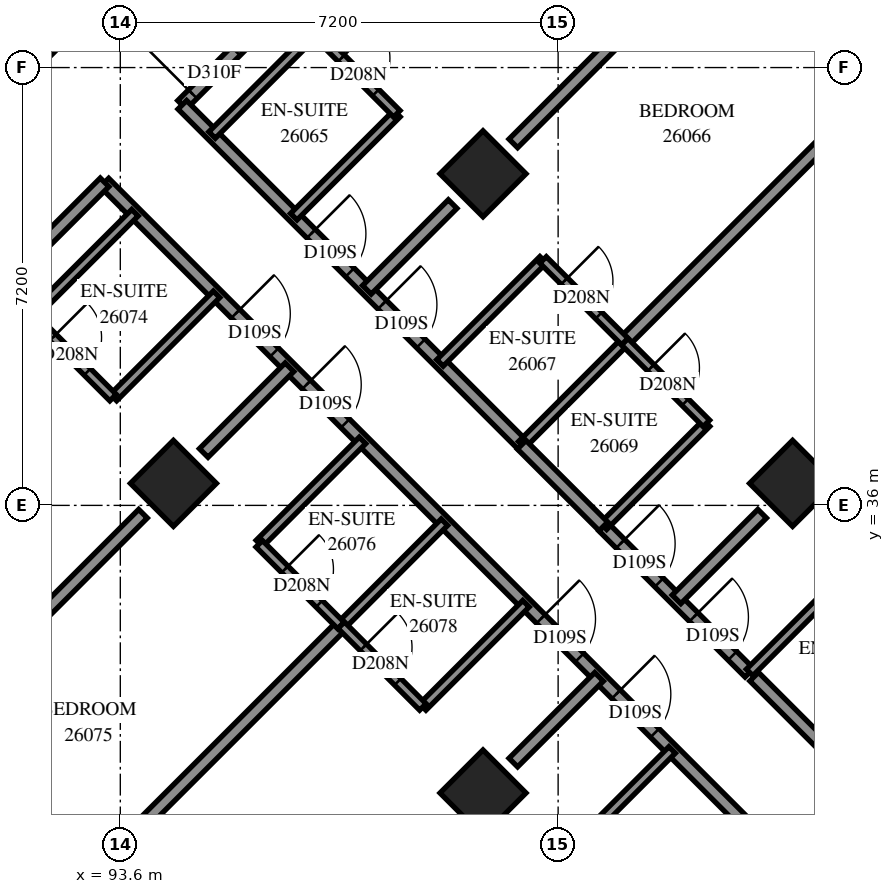
"""IFC4 building model, lengths in metres.
Left out: names, types, materials, properties, quantities, classifications, styles, units other than length and angle.
Written with IfcOpenShell. Run it as: python <this file> out.ifc"""

import sys

from ifc_helpers import new_model, si_unit, direction, frame, frame_2d, origin, origin_2d, place, context, subcontext, project, spatial, rectangle, extrude, element, fill, save


model = new_model("IFC4")
c1 = context("Model", 3, precision=1e-05, world=origin(), true_north=direction((0.0, 1.0)))
c2 = subcontext(c1, "Body", "Model", "MODEL_VIEW")
j1 = project(units=[si_unit("LENGTHUNIT", "METRE"), si_unit("PLANEANGLEUNIT", "RADIAN")], contexts=[c1])
p1 = place(None, origin())
s1 = spatial("IfcSite", under=j1, at=p1, CompositionType="ELEMENT")
p2 = place(p1, origin())
s2 = spatial("IfcBuilding", under=s1, at=p2, CompositionType="ELEMENT")
p3 = place(p2, frame((0.0, 0.0, 98.2)))
s3 = spatial("IfcBuildingStorey", under=s2, at=p3, CompositionType="ELEMENT", Elevation=98.2)
for number, where, z_axis, x_axis in (
    (1, (99.565, 41.453, 0.0), (0.0, 0.0, 1.0), (0.707, -0.707, 0.0)),
    (2, (94.474, 36.362, 0.0), (0.0, 0.0, 1.0), (0.707, -0.707, 0.0)),
    (3, (104.656, 36.362, 0.0), (0.0, 0.0, 1.0), (0.707, -0.707, 0.0)),
    (4, (99.565, 31.271, 0.0), (0.0, 0.0, 1.0), (0.707, -0.707, 0.0)),
):
    element("IfcColumn", number, at=place(p3, frame(where, z_axis=z_axis, x_axis=x_axis)), inside=s3, PredefinedType="COLUMN", context=c2, shape_type="SweptSolid", body=[
        extrude(rectangle(XDim=1.0, YDim=1.0, at=origin_2d()), origin(), (0.0, 0.0, 1.0), 3.1),
    ])
p4 = place(p3, frame((87.12, 38.625, -0.3), z_axis=(0.0, 0.0, 1.0), x_axis=(0.7071067812, 0.7071067812, 0.0)))
e5 = element("IfcWall", 5, at=p4, inside=s3, PredefinedType="SHEAR", context=c2, shape_type="SweptSolid", body=[
    extrude(rectangle(XDim=14.4, YDim=0.8, at=frame_2d((7.2, 0.0))), origin(), (0.0, 0.0, 1.0), 2.7),
])
p5 = place(p4, frame((4.55, 0.0, 0.3)))
e6 = element("IfcOpeningElement", 6, at=p5, cuts=e5, PredefinedType="OPENING", context=c2, shape_type="SweptSolid", body=[
    extrude(rectangle(XDim=1.1, YDim=2.1, at=frame_2d((0.55, 1.05))), frame((0.0, 0.41, 0.0), z_axis=(0.0, -1.0, 0.0), x_axis=(1.0, 0.0, 0.0)), (0.0, 0.0, 1.0), 0.82),
])
p6 = place(p4, frame((11.35, 0.0, 0.3)))
e7 = element("IfcOpeningElement", 7, at=p6, cuts=e5, PredefinedType="OPENING", context=c2, shape_type="SweptSolid", body=[
    extrude(rectangle(XDim=1.1, YDim=2.1, at=frame_2d((0.55, 1.05))), frame((0.0, 0.41, 0.0), z_axis=(0.0, -1.0, 0.0), x_axis=(1.0, 0.0, 0.0)), (0.0, 0.0, 1.0), 0.82),
])
p7 = place(p3, frame((93.339, 41.309, 0.0), z_axis=(0.0, 0.0, 1.0), x_axis=(0.7071067812, -0.7071067812, 0.0)))
e8 = element("IfcWall", 8, at=p7, inside=s3, PredefinedType="PARTITIONING", context=c2, shape_type="SweptSolid", body=[
    extrude(rectangle(XDim=18.702, YDim=0.2, at=frame_2d((9.351, 0.0))), origin(), (0.0, 0.0, 1.0), 3.1),
])
p8 = place(p7, frame((3.05, 0.0, 0.0)))
e9 = element("IfcOpeningElement", 9, at=p8, cuts=e8, PredefinedType="OPENING", context=c2, shape_type="SweptSolid", body=[
    extrude(rectangle(XDim=0.9, YDim=2.1, at=frame_2d((0.45, 1.05))), frame((0.0, 0.11, 0.0), z_axis=(0.0, -1.0, 0.0), x_axis=(1.0, 0.0, 0.0)), (0.0, 0.0, 1.0), 0.22),
])
p9 = place(p7, frame((4.7, 0.0, 0.0)))
e10 = element("IfcOpeningElement", 10, at=p9, cuts=e8, PredefinedType="OPENING", context=c2, shape_type="SweptSolid", body=[
    extrude(rectangle(XDim=0.9, YDim=2.1, at=frame_2d((0.45, 1.05))), frame((0.0, 0.11, 0.0), z_axis=(0.0, -1.0, 0.0), x_axis=(1.0, 0.0, 0.0)), (0.0, 0.0, 1.0), 0.22),
])
p10 = place(p7, frame((10.149, 0.0, 0.0)))
e11 = element("IfcOpeningElement", 11, at=p10, cuts=e8, PredefinedType="OPENING", context=c2, shape_type="SweptSolid", body=[
    extrude(rectangle(XDim=0.9, YDim=2.1, at=frame_2d((0.45, 1.05))), frame((0.0, 0.11, 0.0), z_axis=(0.0, -1.0, 0.0), x_axis=(1.0, 0.0, 0.0)), (0.0, 0.0, 1.0), 0.22),
])
p11 = place(p7, frame((11.9, 0.0, 0.0)))
e12 = element("IfcOpeningElement", 12, at=p11, cuts=e8, PredefinedType="OPENING", context=c2, shape_type="SweptSolid", body=[
    extrude(rectangle(XDim=0.9, YDim=2.1, at=frame_2d((0.45, 1.05))), frame((0.0, 0.11, 0.0), z_axis=(0.0, -1.0, 0.0), x_axis=(1.0, 0.0, 0.0)), (0.0, 0.0, 1.0), 0.22),
])
p12 = place(p7, frame((17.45, 0.0, 0.0)))
e13 = element("IfcOpeningElement", 13, at=p12, cuts=e8, PredefinedType="OPENING", context=c2, shape_type="SweptSolid", body=[
    extrude(rectangle(XDim=0.9, YDim=2.1, at=frame_2d((0.45, 1.05))), frame((0.0, 0.11, 0.0), z_axis=(0.0, -1.0, 0.0), x_axis=(1.0, 0.0, 0.0)), (0.0, 0.0, 1.0), 0.22),
])
p13 = place(p3, frame((86.835, 34.806, 0.0), z_axis=(0.0, 0.0, 1.0), x_axis=(0.7071067812, 0.7071067812, 0.0)))
e14 = element("IfcWall", 14, at=p13, inside=s3, PredefinedType="PARTITIONING", context=c2, shape_type="SweptSolid", body=[
    extrude(rectangle(XDim=9.201, YDim=0.2, at=frame_2d((4.601, 0.0))), origin(), (0.0, 0.0, 1.0), 3.1),
])
p14 = place(p3, frame((94.615, 42.587, 0.0), z_axis=(0.0, 0.0, 1.0), x_axis=(0.7071067812, 0.7071067812, 0.0)))
e15 = element("IfcWall", 15, at=p14, inside=s3, PredefinedType="PARTITIONING", context=c2, shape_type="SweptSolid", body=[
    extrude(rectangle(XDim=9.198, YDim=0.2, at=frame_2d((4.599, 0.0))), origin(), (0.0, 0.0, 1.0), 3.1),
])
p15 = place(p14, frame((0.248, 0.0, 0.0)))
e16 = element("IfcOpeningElement", 16, at=p15, cuts=e15, PredefinedType="OPENING", context=c2, shape_type="SweptSolid", body=[
    extrude(rectangle(XDim=1.0, YDim=2.1, at=frame_2d((0.5, 1.05))), frame((0.0, 0.11, 0.0), z_axis=(0.0, -1.0, 0.0), x_axis=(1.0, 0.0, 0.0)), (0.0, 0.0, 1.0), 0.22),
])
p16 = place(p3, frame((101.896, 38.698, 0.0), z_axis=(0.0, 0.0, 1.0), x_axis=(0.7072296489, 0.7069838921, 0.0)))
e17 = element("IfcWall", 17, at=p16, inside=s3, PredefinedType="PARTITIONING", context=c2, shape_type="SweptSolid", body=[
    extrude(rectangle(XDim=8.545, YDim=0.2, at=frame_2d((4.272, 0.0))), origin(), (0.0, 0.0, 1.0), 3.1),
])
p17 = place(p3, frame((91.46, 28.252, 0.0), z_axis=(0.0, 0.0, 1.0), x_axis=(0.7072292282, 0.706984313, 0.0)))
e18 = element("IfcWall", 18, at=p17, inside=s3, PredefinedType="PARTITIONING", context=c2, shape_type="SweptSolid", body=[
    extrude(rectangle(XDim=8.166, YDim=0.2, at=frame_2d((4.083, 0.0))), origin(), (0.0, 0.0, 1.0), 3.1),
])
p18 = place(p3, frame((94.62, 42.587, 0.0), z_axis=(0.0, 0.0, 1.0), x_axis=(0.7071067812, -0.7071067812, 0.0)))
e19 = element("IfcWall", 19, at=p18, inside=s3, PredefinedType="PARTITIONING", context=c2, shape_type="SweptSolid", body=[
    extrude(rectangle(XDim=7.9, YDim=0.2, at=frame_2d((3.95, 0.0))), origin(), (0.0, 0.0, 1.0), 3.1),
])
p19 = place(p18, frame((2.998, 0.0, 0.0)))
e20 = element("IfcOpeningElement", 20, at=p19, cuts=e19, PredefinedType="OPENING", context=c2, shape_type="SweptSolid", body=[
    extrude(rectangle(XDim=0.9, YDim=2.1, at=frame_2d((0.45, 1.05))), frame((0.0, 0.11, 0.0), z_axis=(0.0, -1.0, 0.0), x_axis=(1.0, 0.0, 0.0)), (0.0, 0.0, 1.0), 0.22),
])
p20 = place(p18, frame((4.649, 0.0, 0.0)))
e21 = element("IfcOpeningElement", 21, at=p20, cuts=e19, PredefinedType="OPENING", context=c2, shape_type="SweptSolid", body=[
    extrude(rectangle(XDim=0.9, YDim=2.1, at=frame_2d((0.45, 1.05))), frame((0.0, 0.11, 0.0), z_axis=(0.0, -1.0, 0.0), x_axis=(1.0, 0.0, 0.0)), (0.0, 0.0, 1.0), 0.22),
])
for number, where, z_axis, x_axis in (
    (22, (89.881, 31.771, 0.0), (0.0, 0.0, 1.0), (0.707, 0.707, 0.0)),
    (23, (100.063, 41.953, 0.0), (0.0, 0.0, 1.0), (0.707, 0.707, 0.0)),
):
    element("IfcWall", number, at=place(p3, frame(where, z_axis=z_axis, x_axis=x_axis)), inside=s3, PredefinedType="PARTITIONING", context=c2, shape_type="SweptSolid", body=[
        extrude(rectangle(XDim=5.787, YDim=0.2, at=frame_2d((2.893, 0.0))), origin(), (0.0, 0.0, 1.0), 3.1),
    ])
p21 = place(p3, frame((104.023, 33.184, 0.0), z_axis=(0.0, 0.0, 1.0), x_axis=(0.7071067812, -0.7071067812, 0.0)))
e24 = element("IfcWall", 24, at=p21, inside=s3, PredefinedType="PARTITIONING", context=c2, shape_type="SweptSolid", body=[
    extrude(rectangle(XDim=5.399, YDim=0.2, at=frame_2d((2.7, 0.0))), origin(), (0.0, 0.0, 1.0), 3.1),
])
p22 = place(p21, frame((4.08, 0.0, 0.0)))
e25 = element("IfcOpeningElement", 25, at=p22, cuts=e24, PredefinedType="OPENING", context=c2, shape_type="SweptSolid", body=[
    extrude(rectangle(XDim=0.9, YDim=2.1, at=frame_2d((0.45, 1.05))), frame((0.0, 0.11, 0.0), z_axis=(0.0, -1.0, 0.0), x_axis=(1.0, 0.0, 0.0)), (0.0, 0.0, 1.0), 0.22),
])
p23 = place(p3, frame((101.541, 35.651, 0.0), z_axis=(0.0, 0.0, 1.0), x_axis=(0.7071067812, -0.7071067812, 0.0)))
e26 = element("IfcWall", 26, at=p23, inside=s3, PredefinedType="PARTITIONING", context=c2, shape_type="SweptSolid", body=[
    extrude(rectangle(XDim=3.4, YDim=0.2, at=frame_2d((1.7, 0.0))), origin(), (0.0, 0.0, 1.0), 3.1),
])
p24 = place(p23, frame((0.4, 0.0, 0.0)))
e27 = element("IfcOpeningElement", 27, at=p24, cuts=e26, PredefinedType="OPENING", context=c2, shape_type="SweptSolid", body=[
    extrude(rectangle(XDim=0.9, YDim=2.1, at=frame_2d((0.45, 1.05))), frame((0.0, 0.11, 0.0), z_axis=(0.0, -1.0, 0.0), x_axis=(1.0, 0.0, 0.0)), (0.0, 0.0, 1.0), 0.22),
])
p25 = place(p23, frame((2.105, 0.0, 0.0)))
e28 = element("IfcOpeningElement", 28, at=p25, cuts=e26, PredefinedType="OPENING", context=c2, shape_type="SweptSolid", body=[
    extrude(rectangle(XDim=0.9, YDim=2.1, at=frame_2d((0.45, 1.05))), frame((0.0, 0.11, 0.0), z_axis=(0.0, -1.0, 0.0), x_axis=(1.0, 0.0, 0.0)), (0.0, 0.0, 1.0), 0.22),
])
for number, where, z_axis, x_axis in (
    (29, (100.977, 30.281, 0.0), (0.0, 0.0, 1.0), (0.707, 0.707, 0.0)),
    (30, (98.573, 32.685, 0.0), (0.0, 0.0, 1.0), (0.707, 0.707, 0.0)),
):
    element("IfcWall", number, at=place(p3, frame(where, z_axis=z_axis, x_axis=x_axis)), inside=s3, PredefinedType="PARTITIONING", context=c2, shape_type="SweptSolid", body=[
        extrude(rectangle(XDim=2.401, YDim=0.15, at=frame_2d((1.201, 0.0))), origin(), (0.0, 0.0, 1.0), 3.1),
    ])
for number, where, z_axis, x_axis in (
    (31, (92.143, 39.117, 0.0), (0.0, 0.0, 1.0), (0.708, 0.707, 0.0)),
    (32, (93.487, 37.773, 0.0), (0.0, 0.0, 1.0), (0.707, 0.708, 0.0)),
    (33, (97.234, 34.026, 0.0), (0.0, 0.0, 1.0), (0.707, 0.708, 0.0)),
    (34, (100.203, 36.997, 0.0), (0.0, 0.0, 1.0), (0.707, 0.708, 0.0)),
):
    element("IfcWall", number, at=place(p3, frame(where, z_axis=z_axis, x_axis=x_axis)), inside=s3, PredefinedType="PARTITIONING", context=c2, shape_type="SweptSolid", body=[
        extrude(rectangle(XDim=2.4, YDim=0.15, at=frame_2d((1.2, 0.0))), origin(), (0.0, 0.0, 1.0), 3.1),
    ])
for number, where, z_axis, x_axis in (
    (35, (96.453, 40.747, 0.0), (0.0, 0.0, 1.0), (0.707, 0.707, 0.0)),
    (36, (95.109, 42.091, 0.0), (0.0, 0.0, 1.0), (0.707, 0.707, 0.0)),
    (37, (95.887, 35.373, 0.0), (0.0, 0.0, 1.0), (0.707, 0.707, 0.0)),
    (38, (98.857, 38.343, 0.0), (0.0, 0.0, 1.0), (0.707, 0.707, 0.0)),
    (39, (101.545, 35.657, 0.0), (0.0, 0.0, 1.0), (0.707, 0.707, 0.0)),
    (40, (103.949, 33.253, 0.0), (0.0, 0.0, 1.0), (0.707, 0.707, 0.0)),
):
    element("IfcWall", number, at=place(p3, frame(where, z_axis=z_axis, x_axis=x_axis)), inside=s3, PredefinedType="PARTITIONING", context=c2, shape_type="SweptSolid", body=[
        extrude(rectangle(XDim=2.398, YDim=0.15, at=frame_2d((1.199, 0.0))), origin(), (0.0, 0.0, 1.0), 3.1),
    ])
for number, where, z_axis, x_axis in (
    (41, (100.063, 31.771, 0.0), (0.0, 0.0, 1.0), (0.707, 0.707, 0.0)),
    (42, (97.655, 39.545, 0.0), (0.0, 0.0, 1.0), (0.707, 0.707, 0.0)),
    (43, (94.972, 36.862, 0.0), (0.0, 0.0, 1.0), (0.707, 0.707, 0.0)),
):
    element("IfcWall", number, at=place(p3, frame(where, z_axis=z_axis, x_axis=x_axis)), inside=s3, PredefinedType="PARTITIONING", context=c2, shape_type="SweptSolid", body=[
        extrude(rectangle(XDim=1.994, YDim=0.2, at=frame_2d((0.997, 0.0))), origin(), (0.0, 0.0, 1.0), 3.1),
    ])
p26 = place(p3, frame((102.747, 34.455, 0.0), z_axis=(0.0, 0.0, 1.0), x_axis=(0.7071067812, 0.7071067812, 0.0)))
e44 = element("IfcWall", 44, at=p26, inside=s3, PredefinedType="PARTITIONING", context=c2, shape_type="SweptSolid", body=[
    extrude(rectangle(XDim=1.991, YDim=0.2, at=frame_2d((0.996, 0.0))), origin(), (0.0, 0.0, 1.0), 3.1),
])
p27 = place(p3, frame((96.803, 43.783, 0.0), z_axis=(0.0, 0.0, 1.0), x_axis=(0.7071067812, -0.7071067812, 0.0)))
e45 = element("IfcWall", 45, at=p27, inside=s3, PredefinedType="PARTITIONING", context=c2, shape_type="SweptSolid", body=[
    extrude(rectangle(XDim=1.901, YDim=0.15, at=frame_2d((0.95, 0.0))), origin(), (0.0, 0.0, 1.0), 3.1),
])
p28 = place(p27, frame((0.609, 0.0, 0.0)))
e46 = element("IfcOpeningElement", 46, at=p28, cuts=e45, PredefinedType="OPENING", context=c2, shape_type="SweptSolid", body=[
    extrude(rectangle(XDim=0.8, YDim=2.1, at=frame_2d((0.4, 1.05))), frame((0.0, 0.085, 0.0), z_axis=(0.0, -1.0, 0.0), x_axis=(1.0, 0.0, 0.0)), (0.0, 0.0, 1.0), 0.17),
])
p29 = place(p3, frame((101.894, 38.693, 0.0), z_axis=(0.0, 0.0, 1.0), x_axis=(0.7071067812, -0.7071067812, 0.0)))
e47 = element("IfcWall", 47, at=p29, inside=s3, PredefinedType="PARTITIONING", context=c2, shape_type="SweptSolid", body=[
    extrude(rectangle(XDim=1.901, YDim=0.15, at=frame_2d((0.95, 0.0))), origin(), (0.0, 0.0, 1.0), 3.1),
])
p30 = place(p29, frame((0.608, 0.0, 0.0)))
e48 = element("IfcOpeningElement", 48, at=p30, cuts=e47, PredefinedType="OPENING", context=c2, shape_type="SweptSolid", body=[
    extrude(rectangle(XDim=0.8, YDim=2.1, at=frame_2d((0.4, 1.05))), frame((0.0, 0.085, 0.0), z_axis=(0.0, -1.0, 0.0), x_axis=(1.0, 0.0, 0.0)), (0.0, 0.0, 1.0), 0.17),
])
p31 = place(p3, frame((95.885, 35.369, 0.0), z_axis=(0.0, 0.0, 1.0), x_axis=(0.7071067812, -0.7071067812, 0.0)))
e49 = element("IfcWall", 49, at=p31, inside=s3, PredefinedType="PARTITIONING", context=c2, shape_type="SweptSolid", body=[
    extrude(rectangle(XDim=1.901, YDim=0.15, at=frame_2d((0.95, 0.0))), origin(), (0.0, 0.0, 1.0), 3.1),
])
p32 = place(p31, frame((0.595, 0.0, 0.0)))
e50 = element("IfcOpeningElement", 50, at=p32, cuts=e49, PredefinedType="OPENING", context=c2, shape_type="SweptSolid", body=[
    extrude(rectangle(XDim=0.8, YDim=2.1, at=frame_2d((0.4, 1.05))), frame((0.0, 0.085, 0.0), z_axis=(0.0, -1.0, 0.0), x_axis=(1.0, 0.0, 0.0)), (0.0, 0.0, 1.0), 0.17),
])
p33 = place(p3, frame((92.137, 39.117, 0.0), z_axis=(0.0, 0.0, 1.0), x_axis=(0.7071067812, -0.7071067812, 0.0)))
e51 = element("IfcWall", 51, at=p33, inside=s3, PredefinedType="PARTITIONING", context=c2, shape_type="SweptSolid", body=[
    extrude(rectangle(XDim=1.901, YDim=0.15, at=frame_2d((0.95, 0.0))), origin(), (0.0, 0.0, 1.0), 3.1),
])
p34 = place(p33, frame((0.502, 0.0, 0.0)))
e52 = element("IfcOpeningElement", 52, at=p34, cuts=e51, PredefinedType="OPENING", context=c2, shape_type="SweptSolid", body=[
    extrude(rectangle(XDim=0.8, YDim=2.1, at=frame_2d((0.4, 1.05))), frame((0.0, 0.085, 0.0), z_axis=(0.0, -1.0, 0.0), x_axis=(1.0, 0.0, 0.0)), (0.0, 0.0, 1.0), 0.17),
])
p35 = place(p3, frame((100.553, 40.037, 0.0), z_axis=(0.0, 0.0, 1.0), x_axis=(0.7076330979, -0.7065800724, 0.0)))
e53 = element("IfcWall", 53, at=p35, inside=s3, PredefinedType="PARTITIONING", context=c2, shape_type="SweptSolid", body=[
    extrude(rectangle(XDim=1.899, YDim=0.15, at=frame_2d((0.95, 0.0))), origin(), (0.0, 0.0, 1.0), 3.1),
])
p36 = place(p35, frame((0.493, 0.0, 0.0)))
e54 = element("IfcOpeningElement", 54, at=p36, cuts=e53, PredefinedType="OPENING", context=c2, shape_type="SweptSolid", body=[
    extrude(rectangle(XDim=0.8, YDim=2.1, at=frame_2d((0.4, 1.05))), frame((0.0, 0.085, 0.0), z_axis=(0.0, -1.0, 0.0), x_axis=(1.0, 0.0, 0.0)), (0.0, 0.0, 1.0), 0.17),
])
p37 = place(p3, frame((97.233, 34.029, 0.0), z_axis=(0.0, 0.0, 1.0), x_axis=(0.7065800724, -0.7076330979, 0.0)))
e55 = element("IfcWall", 55, at=p37, inside=s3, PredefinedType="PARTITIONING", context=c2, shape_type="SweptSolid", body=[
    extrude(rectangle(XDim=1.899, YDim=0.15, at=frame_2d((0.95, 0.0))), origin(), (0.0, 0.0, 1.0), 3.1),
])
p38 = place(p37, frame((0.515, 0.0, 0.0)))
e56 = element("IfcOpeningElement", 56, at=p38, cuts=e55, PredefinedType="OPENING", context=c2, shape_type="SweptSolid", body=[
    extrude(rectangle(XDim=0.8, YDim=2.1, at=frame_2d((0.4, 1.05))), frame((0.0, 0.085, 0.0), z_axis=(0.0, -1.0, 0.0), x_axis=(1.0, 0.0, 0.0)), (0.0, 0.0, 1.0), 0.17),
])
p39 = place(p3, frame((100.201, 36.997, 0.0), z_axis=(0.0, 0.0, 1.0), x_axis=(0.7076330979, -0.7065800724, 0.0)))
e57 = element("IfcWall", 57, at=p39, inside=s3, PredefinedType="PARTITIONING", context=c2, shape_type="SweptSolid", body=[
    extrude(rectangle(XDim=1.899, YDim=0.2, at=frame_2d((0.95, 0.0))), origin(), (0.0, 0.0, 1.0), 3.1),
])
p40 = place(p15, origin())
e58 = element("IfcDoor", 58, at=p40, inside=s3, OperationType="SINGLE_SWING_RIGHT", PredefinedType="DOOR", context=c2, shape_type="SweptSolid", body=[
    extrude(rectangle(XDim=1.0, YDim=2.1, at=frame_2d((0.5, 1.05))), frame((0.0, 0.025, 0.0), z_axis=(0.0, -1.0, 0.0), x_axis=(1.0, 0.0, 0.0)), (0.0, 0.0, 1.0), 0.05),
])
fill(e16, e58)
p41 = place(p19, origin())
e59 = element("IfcDoor", 59, at=p41, inside=s3, OperationType="SINGLE_SWING_RIGHT", PredefinedType="DOOR", context=c2, shape_type="SweptSolid", body=[
    extrude(rectangle(XDim=0.9, YDim=2.1, at=frame_2d((0.45, 1.05))), frame((0.0, 0.025, 0.0), z_axis=(0.0, -1.0, 0.0), x_axis=(1.0, 0.0, 0.0)), (0.0, 0.0, 1.0), 0.05),
])
fill(e20, e59)
p42 = place(p28, origin())
e60 = element("IfcDoor", 60, at=p42, inside=s3, OperationType="SINGLE_SWING_RIGHT", PredefinedType="DOOR", context=c2, shape_type="SweptSolid", body=[
    extrude(rectangle(XDim=0.8, YDim=2.1, at=frame_2d((0.4, 1.05))), frame((0.0, 0.025, 0.0), z_axis=(0.0, -1.0, 0.0), x_axis=(1.0, 0.0, 0.0)), (0.0, 0.0, 1.0), 0.05),
])
fill(e46, e60)
p43 = place(p20, origin())
e61 = element("IfcDoor", 61, at=p43, inside=s3, OperationType="SINGLE_SWING_LEFT", PredefinedType="DOOR", context=c2, shape_type="SweptSolid", body=[
    extrude(rectangle(XDim=0.9, YDim=2.1, at=frame_2d((0.45, 1.05))), frame((0.0, 0.025, 0.0), z_axis=(0.0, -1.0, 0.0), x_axis=(1.0, 0.0, 0.0)), (0.0, 0.0, 1.0), 0.05),
])
fill(e21, e61)
p44 = place(p36, origin())
e62 = element("IfcDoor", 62, at=p44, inside=s3, OperationType="SINGLE_SWING_RIGHT", PredefinedType="DOOR", context=c2, shape_type="SweptSolid", body=[
    extrude(rectangle(XDim=0.8, YDim=2.1, at=frame_2d((0.4, 1.05))), frame((0.0, 0.025, 0.0), z_axis=(0.0, -1.0, 0.0), x_axis=(1.0, 0.0, 0.0)), (0.0, 0.0, 1.0), 0.05),
])
fill(e54, e62)
p45 = place(p24, origin())
e63 = element("IfcDoor", 63, at=p45, inside=s3, OperationType="SINGLE_SWING_RIGHT", PredefinedType="DOOR", context=c2, shape_type="SweptSolid", body=[
    extrude(rectangle(XDim=0.9, YDim=2.1, at=frame_2d((0.45, 1.05))), frame((0.0, 0.025, 0.0), z_axis=(0.0, -1.0, 0.0), x_axis=(1.0, 0.0, 0.0)), (0.0, 0.0, 1.0), 0.05),
])
fill(e27, e63)
p46 = place(p30, origin())
e64 = element("IfcDoor", 64, at=p46, inside=s3, OperationType="SINGLE_SWING_RIGHT", PredefinedType="DOOR", context=c2, shape_type="SweptSolid", body=[
    extrude(rectangle(XDim=0.8, YDim=2.1, at=frame_2d((0.4, 1.05))), frame((0.0, 0.025, 0.0), z_axis=(0.0, -1.0, 0.0), x_axis=(1.0, 0.0, 0.0)), (0.0, 0.0, 1.0), 0.05),
])
fill(e48, e64)
p47 = place(p25, origin())
e65 = element("IfcDoor", 65, at=p47, inside=s3, OperationType="SINGLE_SWING_LEFT", PredefinedType="DOOR", context=c2, shape_type="SweptSolid", body=[
    extrude(rectangle(XDim=0.9, YDim=2.1, at=frame_2d((0.45, 1.05))), frame((0.0, 0.025, 0.0), z_axis=(0.0, -1.0, 0.0), x_axis=(1.0, 0.0, 0.0)), (0.0, 0.0, 1.0), 0.05),
])
fill(e28, e65)
p48 = place(p8, origin())
e66 = element("IfcDoor", 66, at=p48, inside=s3, OperationType="SINGLE_SWING_LEFT", PredefinedType="DOOR", context=c2, shape_type="SweptSolid", body=[
    extrude(rectangle(XDim=0.9, YDim=2.1, at=frame_2d((0.45, 1.05))), frame((0.0, 0.025, 0.0), z_axis=(0.0, -1.0, 0.0), x_axis=(1.0, 0.0, 0.0)), (0.0, 0.0, 1.0), 0.05),
])
fill(e9, e66)
p49 = place(p34, origin())
e67 = element("IfcDoor", 67, at=p49, inside=s3, OperationType="SINGLE_SWING_RIGHT", PredefinedType="DOOR", context=c2, shape_type="SweptSolid", body=[
    extrude(rectangle(XDim=0.8, YDim=2.1, at=frame_2d((0.4, 1.05))), frame((0.0, 0.025, 0.0), z_axis=(0.0, -1.0, 0.0), x_axis=(1.0, 0.0, 0.0)), (0.0, 0.0, 1.0), 0.05),
])
fill(e52, e67)
p50 = place(p9, origin())
e68 = element("IfcDoor", 68, at=p50, inside=s3, OperationType="SINGLE_SWING_RIGHT", PredefinedType="DOOR", context=c2, shape_type="SweptSolid", body=[
    extrude(rectangle(XDim=0.9, YDim=2.1, at=frame_2d((0.45, 1.05))), frame((0.0, 0.025, 0.0), z_axis=(0.0, -1.0, 0.0), x_axis=(1.0, 0.0, 0.0)), (0.0, 0.0, 1.0), 0.05),
])
fill(e10, e68)
p51 = place(p32, origin())
e69 = element("IfcDoor", 69, at=p51, inside=s3, OperationType="SINGLE_SWING_RIGHT", PredefinedType="DOOR", context=c2, shape_type="SweptSolid", body=[
    extrude(rectangle(XDim=0.8, YDim=2.1, at=frame_2d((0.4, 1.05))), frame((0.0, 0.025, 0.0), z_axis=(0.0, -1.0, 0.0), x_axis=(1.0, 0.0, 0.0)), (0.0, 0.0, 1.0), 0.05),
])
fill(e50, e69)
p52 = place(p10, origin())
e70 = element("IfcDoor", 70, at=p52, inside=s3, OperationType="SINGLE_SWING_LEFT", PredefinedType="DOOR", context=c2, shape_type="SweptSolid", body=[
    extrude(rectangle(XDim=0.9, YDim=2.1, at=frame_2d((0.45, 1.05))), frame((0.0, 0.025, 0.0), z_axis=(0.0, -1.0, 0.0), x_axis=(1.0, 0.0, 0.0)), (0.0, 0.0, 1.0), 0.05),
])
fill(e11, e70)
p53 = place(p38, origin())
e71 = element("IfcDoor", 71, at=p53, inside=s3, OperationType="SINGLE_SWING_RIGHT", PredefinedType="DOOR", context=c2, shape_type="SweptSolid", body=[
    extrude(rectangle(XDim=0.8, YDim=2.1, at=frame_2d((0.4, 1.05))), frame((0.0, 0.025, 0.0), z_axis=(0.0, -1.0, 0.0), x_axis=(1.0, 0.0, 0.0)), (0.0, 0.0, 1.0), 0.05),
])
fill(e56, e71)
p54 = place(p11, origin())
e72 = element("IfcDoor", 72, at=p54, inside=s3, OperationType="SINGLE_SWING_RIGHT", PredefinedType="DOOR", context=c2, shape_type="SweptSolid", body=[
    extrude(rectangle(XDim=0.9, YDim=2.1, at=frame_2d((0.45, 1.05))), frame((0.0, 0.025, 0.0), z_axis=(0.0, -1.0, 0.0), x_axis=(1.0, 0.0, 0.0)), (0.0, 0.0, 1.0), 0.05),
])
fill(e12, e72)
save(model, sys.argv[1])
